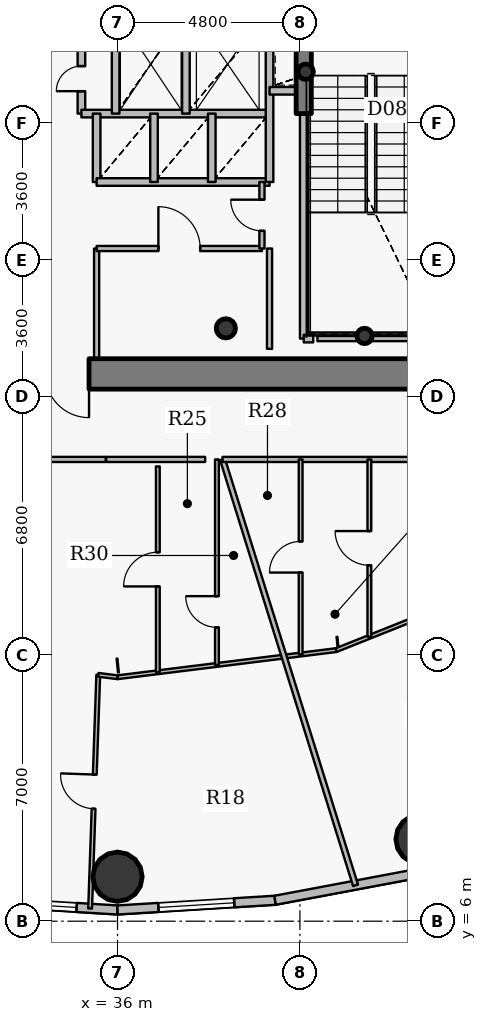
"""IFC4 building model, lengths in metres.
Left out: names, types, materials, properties, quantities, classifications, styles, units other than length and angle.
Written with IfcOpenShell. Run it as: python <this file> out.ifc"""

import sys

from ifc_helpers import new_model, si_unit, direction, frame, frame_2d, origin, origin_2d, place, context, subcontext, project, spatial, rectangle, hollow_circle, extrude, source, transform, mapped, element, fill, save


model = new_model("IFC4")
c1 = context("Model", 3, precision=1e-05, world=origin(), true_north=direction((0.0, 1.0)))
c2 = subcontext(c1, "Body", "Model", "MODEL_VIEW")
j1 = project(units=[si_unit("LENGTHUNIT", "METRE"), si_unit("PLANEANGLEUNIT", "RADIAN")], contexts=[c1])
p1 = place(None, origin())
s1 = spatial("IfcSite", under=j1, at=p1, CompositionType="ELEMENT")
p2 = place(p1, origin())
s2 = spatial("IfcBuilding", under=s1, at=p2, CompositionType="ELEMENT")
p3 = place(p2, frame((0.0, 0.0, 174.9)))
s3 = spatial("IfcBuildingStorey", under=s2, at=p3, CompositionType="ELEMENT", Elevation=174.9)
p4 = place(p3, frame((38.85, 21.6, 0.0), z_axis=(0.0, 0.0, 1.0), x_axis=(1.0, 0.0, 0.0)))
e1 = element("IfcColumn", 1, at=p4, inside=s3, PredefinedType="COLUMN", context=c2, shape_type="SweptSolid", body=[
    extrude(hollow_circle(Radius=0.254, WallThickness=0.02, at=origin_2d()), origin(), (0.0, 0.0, 1.0), 3.75),
])
for number, where, z_axis, x_axis in (
    (2, (42.5, 21.4, 0.0), (0.0, 0.0, 1.0), (1.0, 0.0, 0.0)),
    (3, (40.95, 28.35, 0.0), (0.0, 0.0, 1.0), (1.0, 0.0, 0.0)),
):
    element("IfcColumn", number, at=place(p3, frame(where, z_axis=z_axis, x_axis=x_axis)), inside=s3, PredefinedType="COLUMN", context=c2, shape_type="SweptSolid", body=[
        extrude(hollow_circle(Radius=0.203, WallThickness=0.016, at=origin_2d()), origin(), (0.0, 0.0, 1.0), 3.75),
    ])
p5 = place(p3, frame((44.8, 20.4, 0.0), z_axis=(0.0, 0.0, 1.0), x_axis=(-1.0, 0.0, 0.0)))
e4 = element("IfcWall", 4, at=p5, inside=s3, PredefinedType="SHEAR", context=c2, shape_type="SweptSolid", body=[
    extrude(rectangle(XDim=17.6, YDim=0.8, at=frame_2d((8.8, 0.0))), origin(), (0.0, 0.0, 1.0), 2.95),
])
p6 = place(p5, frame((9.55, 0.0, 0.0)))
e5 = element("IfcOpeningElement", 5, at=p6, cuts=e4, PredefinedType="OPENING", context=c2, shape_type="SweptSolid", body=[
    extrude(rectangle(XDim=1.15, YDim=2.15, at=origin_2d()), frame((0.575, 0.41, 1.075), z_axis=(0.0, -1.0, 0.0), x_axis=(1.0, 0.0, 0.0)), (0.0, 0.0, 1.0), 0.82),
])
p7 = place(p3, frame((40.9, 27.25, 0.0), z_axis=(0.0, 0.0, 1.0), x_axis=(0.0, 1.0, 0.0)))
e6 = element("IfcWall", 6, at=p7, inside=s3, PredefinedType="SHEAR", context=c2, shape_type="SweptSolid", body=[
    extrude(rectangle(XDim=2.6, YDim=0.4, at=frame_2d((1.3, 0.0))), origin(), (0.0, 0.0, 1.0), 3.1),
])
for number, where, z_axis, x_axis in (
    (7, (36.0, 7.17, 0.0), (0.0, 0.0, 1.0), (1.0, 0.0, 0.0)),
    (8, (43.973, 8.159, 0.0), (0.0, 0.0, 1.0), (1.0, 0.0, 0.0)),
):
    element("IfcColumn", number, at=place(p3, frame(where, z_axis=z_axis, x_axis=x_axis)), inside=s3, PredefinedType="COLUMN", context=c2, shape_type="SweptSolid", body=[
        extrude(hollow_circle(Radius=0.65, WallThickness=0.04, at=origin_2d()), origin(), (0.0, 0.0, 1.0), 3.75),
    ])
p8 = place(p3, frame((36.0, 6.295, 0.0), z_axis=(0.0, 0.0, 1.0), x_axis=(-0.998104600619, 0.061540281305, 0.0)))
e9 = element("IfcWall", 9, at=p8, inside=s3, PredefinedType="SOLIDWALL", context=c2, shape_type="SweptSolid", body=[
    extrude(rectangle(XDim=4.154, YDim=0.24, at=frame_2d((2.077, 0.0))), origin(), (0.0, 0.0, 1.0), 3.5),
])
p9 = place(p8, frame((1.077, 0.0, 0.9)))
e10 = element("IfcOpeningElement", 10, at=p9, cuts=e9, PredefinedType="OPENING", context=c2, shape_type="SweptSolid", body=[
    extrude(rectangle(XDim=2.0, YDim=1.75, at=origin_2d()), frame((1.0, 0.13, 0.875), z_axis=(0.0, -1.0, 0.0), x_axis=(1.0, 0.0, 0.0)), (0.0, 0.0, 1.0), 0.26),
])
p10 = place(p3, frame((40.146, 6.551, 0.0), z_axis=(0.0, 0.0, 1.0), x_axis=(-0.998104600619, -0.061540281305, 0.0)))
e11 = element("IfcWall", 11, at=p10, inside=s3, PredefinedType="SOLIDWALL", context=c2, shape_type="SweptSolid", body=[
    extrude(rectangle(XDim=4.154, YDim=0.24, at=frame_2d((2.077, 0.0))), origin(), (0.0, 0.0, 1.0), 3.5),
])
p11 = place(p10, frame((1.077, 0.0, 0.9)))
e12 = element("IfcOpeningElement", 12, at=p11, cuts=e11, PredefinedType="OPENING", context=c2, shape_type="SweptSolid", body=[
    extrude(rectangle(XDim=2.0, YDim=1.75, at=origin_2d()), frame((1.0, 0.13, 0.875), z_axis=(0.0, -1.0, 0.0), x_axis=(1.0, 0.0, 0.0)), (0.0, 0.0, 1.0), 0.26),
])
p12 = place(p3, frame((44.189, 7.311, 0.0), z_axis=(0.0, 0.0, 1.0), x_axis=(-0.982788108205, -0.184736391573, 0.0)))
e13 = element("IfcWall", 13, at=p12, inside=s3, PredefinedType="SOLIDWALL", context=c2, shape_type="SweptSolid", body=[
    extrude(rectangle(XDim=4.114, YDim=0.24, at=frame_2d((2.057, 0.0))), origin(), (0.0, 0.0, 1.0), 3.5),
])
p13 = place(p3, frame((24.35, 18.15, 0.0), z_axis=(0.0, 0.0, 1.0), x_axis=(1.0, 0.0, 0.0)))
e14 = element("IfcWall", 14, at=p13, inside=s3, PredefinedType="PARTITIONING", context=c2, shape_type="SweptSolid", body=[
    extrude(rectangle(XDim=11.341, YDim=0.135, at=frame_2d((5.67, 0.0))), origin(), (0.0, 0.0, 1.0), 2.935),
])
p14 = place(p13, frame((7.171, 0.0, 0.0)))
e15 = element("IfcOpeningElement", 15, at=p14, cuts=e14, PredefinedType="OPENING", context=c2, shape_type="SweptSolid", body=[
    extrude(rectangle(XDim=1.0, YDim=2.15, at=origin_2d()), frame((0.5, 0.078, 1.075), z_axis=(0.0, -1.0, 0.0), x_axis=(1.0, 0.0, 0.0)), (0.0, 0.0, 1.0), 0.155),
])
p15 = place(p3, frame((35.05, 27.25, 0.0), z_axis=(0.0, 0.0, 1.0), x_axis=(0.0, 1.0, 0.0)))
e16 = element("IfcWall", 16, at=p15, inside=s3, PredefinedType="PARTITIONING", context=c2, shape_type="SweptSolid", body=[
    extrude(rectangle(XDim=3.6, YDim=0.2, at=frame_2d((1.8, 0.0))), origin(), (0.0, 0.0, 1.0), 3.5),
])
p16 = place(p15, frame((0.59, 0.0, 0.0)))
e17 = element("IfcOpeningElement", 17, at=p16, cuts=e16, PredefinedType="OPENING", context=c2, shape_type="SweptSolid", body=[
    extrude(rectangle(XDim=0.66, YDim=2.05, at=origin_2d()), frame((0.33, 0.11, 1.025), z_axis=(0.0, -1.0, 0.0), x_axis=(1.0, 0.0, 0.0)), (0.0, 0.0, 1.0), 0.22),
])
p17 = place(p15, frame((2.35, 0.0, 0.0)))
e18 = element("IfcOpeningElement", 18, at=p17, cuts=e16, PredefinedType="OPENING", context=c2, shape_type="SweptSolid", body=[
    extrude(rectangle(XDim=0.66, YDim=2.05, at=origin_2d()), frame((0.33, 0.11, 1.025), z_axis=(0.0, -1.0, 0.0), x_axis=(1.0, 0.0, 0.0)), (0.0, 0.0, 1.0), 0.22),
])
p18 = place(p3, frame((35.05, 27.25, 0.0), z_axis=(0.0, 0.0, 1.0), x_axis=(1.0, 0.0, 0.0)))
e19 = element("IfcWall", 19, at=p18, inside=s3, PredefinedType="PARTITIONING", context=c2, shape_type="SweptSolid", body=[
    extrude(rectangle(XDim=4.95, YDim=0.2, at=frame_2d((2.475, 0.0))), origin(), (0.0, 0.0, 1.0), 3.085),
])
p19 = place(p3, frame((35.278, 6.334, 0.0), z_axis=(0.0, 0.0, 1.0), x_axis=(0.034887406989, 0.999391249128, 0.0)))
e20 = element("IfcWall", 20, at=p19, inside=s3, PredefinedType="PARTITIONING", context=c2, shape_type="SweptSolid", body=[
    extrude(rectangle(XDim=6.151, YDim=0.1, at=frame_2d((3.076, 0.0))), origin(), (0.0, 0.0, 1.0), 2.935),
])
p20 = place(p19, frame((2.625, 0.0, 0.0)))
e21 = element("IfcOpeningElement", 21, at=p20, cuts=e20, PredefinedType="OPENING", context=c2, shape_type="SweptSolid", body=[
    extrude(rectangle(XDim=0.9, YDim=2.1, at=origin_2d()), frame((0.45, 0.06, 1.05), z_axis=(0.0, -1.0, 0.0), x_axis=(1.0, 0.0, 0.0)), (0.0, 0.0, 1.0), 0.12),
])
p21 = place(p3, frame((35.45, 20.8, 0.0), z_axis=(0.0, 0.0, 1.0), x_axis=(0.0, 1.0, 0.0)))
e22 = element("IfcWall", 22, at=p21, inside=s3, PredefinedType="PARTITIONING", context=c2, shape_type="SweptSolid", body=[
    extrude(rectangle(XDim=2.9, YDim=0.135, at=frame_2d((1.45, 0.0))), origin(), (0.0, 0.0, 1.0), 3.085),
])
p22 = place(p3, frame((35.45, 23.7, 0.0), z_axis=(0.0, 0.0, 1.0), x_axis=(1.0, 0.0, 0.0)))
e23 = element("IfcWall", 23, at=p22, inside=s3, PredefinedType="PARTITIONING", context=c2, shape_type="SweptSolid", body=[
    extrude(rectangle(XDim=4.35, YDim=0.135, at=frame_2d((2.175, 0.0))), origin(), (0.0, 0.0, 1.0), 3.085),
])
p23 = place(p22, frame((1.625, 0.0, 0.0)))
e24 = element("IfcOpeningElement", 24, at=p23, cuts=e23, PredefinedType="OPENING", context=c2, shape_type="SweptSolid", body=[
    extrude(rectangle(XDim=1.1, YDim=2.15, at=origin_2d()), frame((0.55, 0.078, 1.075), z_axis=(0.0, -1.0, 0.0), x_axis=(1.0, 0.0, 0.0)), (0.0, 0.0, 1.0), 0.155),
])
p24 = place(p3, frame((35.45, 25.45, 0.0), z_axis=(0.0, 0.0, 1.0), x_axis=(0.0, 1.0, 0.0)))
e25 = element("IfcWall", 25, at=p24, inside=s3, PredefinedType="PARTITIONING", context=c2, shape_type="SweptSolid", body=[
    extrude(rectangle(XDim=1.8, YDim=0.2, at=frame_2d((0.9, 0.0))), origin(), (0.0, 0.0, 1.0), 3.5),
])
p25 = place(p3, frame((35.45, 25.45, 0.0), z_axis=(0.0, 0.0, 1.0), x_axis=(1.0, 0.0, 0.0)))
e26 = element("IfcWall", 26, at=p25, inside=s3, PredefinedType="PARTITIONING", context=c2, shape_type="SweptSolid", body=[
    extrude(rectangle(XDim=4.55, YDim=0.2, at=frame_2d((2.275, 0.0))), origin(), (0.0, 0.0, 1.0), 3.085),
])
p26 = place(p3, frame((35.493, 12.482, 0.0), z_axis=(0.0, 0.0, 1.0), x_axis=(0.992373140554, -0.123270231229, 0.0)))
e27 = element("IfcWall", 27, at=p26, inside=s3, PredefinedType="PARTITIONING", context=c2, shape_type="SweptSolid", body=[
    extrude(rectangle(XDim=0.511, YDim=0.1, at=frame_2d((0.255, 0.0))), origin(), (0.0, 0.0, 1.0), 2.935),
])
p27 = place(p3, frame((35.95, 27.25, 0.0), z_axis=(0.0, 0.0, 1.0), x_axis=(0.0, 1.0, 0.0)))
e28 = element("IfcWall", 28, at=p27, inside=s3, PredefinedType="PARTITIONING", context=c2, shape_type="SweptSolid", body=[
    extrude(rectangle(XDim=3.8, YDim=0.2, at=frame_2d((1.9, 0.0))), origin(), (0.0, 0.0, 1.0), 3.5),
])
p28 = place(p3, frame((36.0, 12.419, 0.0), z_axis=(0.0, 0.0, 1.0), x_axis=(0.992396615981, 0.123081097612, 0.0)))
e29 = element("IfcWall", 29, at=p28, inside=s3, PredefinedType="PARTITIONING", context=c2, shape_type="SweptSolid", body=[
    extrude(rectangle(XDim=5.798, YDim=0.1, at=frame_2d((2.899, 0.0))), origin(), (0.0, 0.0, 1.0), 2.935),
])
p29 = place(p3, frame((36.96, 25.45, 0.0), z_axis=(0.0, 0.0, 1.0), x_axis=(0.0, 1.0, 0.0)))
e30 = element("IfcWall", 30, at=p29, inside=s3, PredefinedType="PARTITIONING", context=c2, shape_type="SweptSolid", body=[
    extrude(rectangle(XDim=1.8, YDim=0.2, at=frame_2d((0.9, 0.0))), origin(), (0.0, 0.0, 1.0), 3.5),
])
p30 = place(p3, frame((37.061, 12.551, 0.0), z_axis=(0.0, 0.0, 1.0), x_axis=(0.0, 1.0, 0.0)))
e31 = element("IfcWall", 31, at=p30, inside=s3, PredefinedType="PARTITIONING", context=c2, shape_type="SweptSolid", body=[
    extrude(rectangle(XDim=5.416, YDim=0.1, at=frame_2d((2.708, 0.0))), origin(), (0.0, 0.0, 1.0), 3.185),
])
p31 = place(p30, frame((2.258, 0.0, 0.0)))
e32 = element("IfcOpeningElement", 32, at=p31, cuts=e31, PredefinedType="OPENING", context=c2, shape_type="SweptSolid", body=[
    extrude(rectangle(XDim=0.9, YDim=2.1, at=origin_2d()), frame((0.45, 0.06, 1.05), z_axis=(0.0, -1.0, 0.0), x_axis=(1.0, 0.0, 0.0)), (0.0, 0.0, 1.0), 0.12),
])
p32 = place(p3, frame((37.8, 27.25, 0.0), z_axis=(0.0, 0.0, 1.0), x_axis=(0.0, 1.0, 0.0)))
e33 = element("IfcWall", 33, at=p32, inside=s3, PredefinedType="PARTITIONING", context=c2, shape_type="SweptSolid", body=[
    extrude(rectangle(XDim=2.6, YDim=0.2, at=frame_2d((1.3, 0.0))), origin(), (0.0, 0.0, 1.0), 3.5),
])
p33 = place(p3, frame((38.48, 25.45, 0.0), z_axis=(0.0, 0.0, 1.0), x_axis=(0.0, 1.0, 0.0)))
e34 = element("IfcWall", 34, at=p33, inside=s3, PredefinedType="PARTITIONING", context=c2, shape_type="SweptSolid", body=[
    extrude(rectangle(XDim=1.8, YDim=0.2, at=frame_2d((0.9, 0.0))), origin(), (0.0, 0.0, 1.0), 3.5),
])
p34 = place(p3, frame((38.616, 12.743, 0.0), z_axis=(0.0, 0.0, 1.0), x_axis=(0.0, 1.0, 0.0)))
e35 = element("IfcWall", 35, at=p34, inside=s3, PredefinedType="PARTITIONING", context=c2, shape_type="SweptSolid", body=[
    extrude(rectangle(XDim=5.406, YDim=0.1, at=frame_2d((2.703, 0.0))), origin(), (0.0, 0.0, 1.0), 3.185),
])
p35 = place(p34, frame((0.989, 0.0, 0.0)))
e36 = element("IfcOpeningElement", 36, at=p35, cuts=e35, PredefinedType="OPENING", context=c2, shape_type="SweptSolid", body=[
    extrude(rectangle(XDim=0.82, YDim=2.1, at=origin_2d()), frame((0.41, 0.06, 1.05), z_axis=(0.0, -1.0, 0.0), x_axis=(1.0, 0.0, 0.0)), (0.0, 0.0, 1.0), 0.12),
])
p36 = place(p3, frame((38.764, 18.15, 0.0), z_axis=(0.0, 0.0, 1.0), x_axis=(0.298084348379, -0.954539533624, 0.0)))
e37 = element("IfcWall", 37, at=p36, inside=s3, PredefinedType="PARTITIONING", context=c2, shape_type="SweptSolid", body=[
    extrude(rectangle(XDim=11.74, YDim=0.135, at=frame_2d((5.87, 0.0))), origin(), (0.0, 0.0, 1.0), 2.935),
])
p37 = place(p3, frame((38.764, 18.15, 0.0), z_axis=(0.0, 0.0, 1.0), x_axis=(1.0, 0.0, 0.0)))
e38 = element("IfcWall", 38, at=p37, inside=s3, PredefinedType="PARTITIONING", context=c2, shape_type="SweptSolid", body=[
    extrude(rectangle(XDim=9.436, YDim=0.135, at=frame_2d((4.718, 0.0))), origin(), (0.0, 0.0, 1.0), 2.935),
])
p38 = place(p37, frame((6.13, 0.0, 0.0)))
e39 = element("IfcOpeningElement", 39, at=p38, cuts=e38, PredefinedType="OPENING", context=c2, shape_type="SweptSolid", body=[
    extrude(rectangle(XDim=1.0, YDim=2.15, at=origin_2d()), frame((0.5, 0.078, 1.075), z_axis=(0.0, -1.0, 0.0), x_axis=(1.0, 0.0, 0.0)), (0.0, 0.0, 1.0), 0.155),
])
p39 = place(p3, frame((39.8, 23.7, 0.0), z_axis=(0.0, 0.0, 1.0), x_axis=(0.0, 1.0, 0.0)))
e40 = element("IfcWall", 40, at=p39, inside=s3, PredefinedType="PARTITIONING", context=c2, shape_type="SweptSolid", body=[
    extrude(rectangle(XDim=1.75, YDim=0.135, at=frame_2d((0.875, 0.0))), origin(), (0.0, 0.0, 1.0), 3.5),
])
p40 = place(p39, frame((0.465, 0.0, 0.0)))
e41 = element("IfcOpeningElement", 41, at=p40, cuts=e40, PredefinedType="OPENING", context=c2, shape_type="SweptSolid", body=[
    extrude(rectangle(XDim=0.82, YDim=2.1, at=origin_2d()), frame((0.41, 0.078, 1.05), z_axis=(0.0, -1.0, 0.0), x_axis=(1.0, 0.0, 0.0)), (0.0, 0.0, 1.0), 0.155),
])
p41 = place(p3, frame((40.0, 25.45, 0.0), z_axis=(0.0, 0.0, 1.0), x_axis=(0.0, 1.0, 0.0)))
e42 = element("IfcWall", 42, at=p41, inside=s3, PredefinedType="PARTITIONING", context=c2, shape_type="SweptSolid", body=[
    extrude(rectangle(XDim=4.4, YDim=0.2, at=frame_2d((2.2, 0.0))), origin(), (0.0, 0.0, 1.0), 3.5),
])
p42 = place(p3, frame((40.0, 27.85, 0.0), z_axis=(0.0, 0.0, 1.0), x_axis=(1.0, 0.0, 0.0)))
e43 = element("IfcWall", 43, at=p42, inside=s3, PredefinedType="PARTITIONING", context=c2, shape_type="SweptSolid", body=[
    extrude(rectangle(XDim=0.9, YDim=0.2, at=frame_2d((0.45, 0.0))), origin(), (0.0, 0.0, 1.0), 3.5),
])
p43 = place(p3, frame((40.819, 13.017, 0.0), z_axis=(0.0, 0.0, 1.0), x_axis=(0.0, 1.0, 0.0)))
e44 = element("IfcWall", 44, at=p43, inside=s3, PredefinedType="PARTITIONING", context=c2, shape_type="SweptSolid", body=[
    extrude(rectangle(XDim=5.133, YDim=0.1, at=frame_2d((2.567, 0.0))), origin(), (0.0, 0.0, 1.0), 2.935),
])
p44 = place(p43, frame((2.157, 0.0, 0.0)))
e45 = element("IfcOpeningElement", 45, at=p44, cuts=e44, PredefinedType="OPENING", context=c2, shape_type="SweptSolid", body=[
    extrude(rectangle(XDim=0.82, YDim=2.1, at=origin_2d()), frame((0.41, 0.06, 1.05), z_axis=(0.0, -1.0, 0.0), x_axis=(1.0, 0.0, 0.0)), (0.0, 0.0, 1.0), 0.12),
])
p45 = place(p3, frame((40.9, 21.33, 0.0), z_axis=(0.0, 0.0, 1.0), x_axis=(0.0, 1.0, 0.0)))
e46 = element("IfcWall", 46, at=p45, inside=s3, PredefinedType="PARTITIONING", context=c2, shape_type="SweptSolid", body=[
    extrude(rectangle(XDim=5.91, YDim=0.2, at=frame_2d((2.955, 0.0))), origin(), (0.0, 0.0, 1.0), 3.035),
])
p46 = place(p3, frame((40.9, 21.33, 0.0), z_axis=(0.0, 0.0, 1.0), x_axis=(1.0, 0.0, 0.0)))
e47 = element("IfcWall", 47, at=p46, inside=s3, PredefinedType="PARTITIONING", context=c2, shape_type="SweptSolid", body=[
    extrude(rectangle(XDim=0.25, YDim=0.2, at=frame_2d((0.125, 0.0))), origin(), (0.0, 0.0, 1.0), 3.035),
])
p47 = place(p3, frame((41.754, 13.133, 0.0), z_axis=(0.0, 0.0, 1.0), x_axis=(0.928786664236, 0.370614803182, 0.0)))
e48 = element("IfcWall", 48, at=p47, inside=s3, PredefinedType="PARTITIONING", context=c2, shape_type="SweptSolid", body=[
    extrude(rectangle(XDim=3.798, YDim=0.1, at=frame_2d((1.899, 0.0))), origin(), (0.0, 0.0, 1.0), 2.935),
])
p48 = place(p3, frame((42.627, 13.481, 0.0), z_axis=(0.0, 0.0, 1.0), x_axis=(0.0, 1.0, 0.0)))
e49 = element("IfcWall", 49, at=p48, inside=s3, PredefinedType="PARTITIONING", context=c2, shape_type="SweptSolid", body=[
    extrude(rectangle(XDim=4.669, YDim=0.1, at=frame_2d((2.334, 0.0))), origin(), (0.0, 0.0, 1.0), 3.5),
])
p49 = place(p48, frame((1.885, 0.0, 0.0)))
e50 = element("IfcOpeningElement", 50, at=p49, cuts=e49, PredefinedType="OPENING", context=c2, shape_type="SweptSolid", body=[
    extrude(rectangle(XDim=0.9, YDim=2.1, at=origin_2d()), frame((0.45, 0.06, 1.05), z_axis=(0.0, -1.0, 0.0), x_axis=(1.0, 0.0, 0.0)), (0.0, 0.0, 1.0), 0.12),
])
p50 = place(p3, frame((44.08, 21.33, 0.0), z_axis=(0.0, 0.0, 1.0), x_axis=(-1.0, 0.0, 0.0)))
e51 = element("IfcWall", 51, at=p50, inside=s3, PredefinedType="PARTITIONING", context=c2, shape_type="SweptSolid", body=[
    extrude(rectangle(XDim=2.82, YDim=0.135, at=frame_2d((1.41, 0.0))), origin(), (0.0, 0.0, 1.0), 3.035),
])
p51 = place(p3, frame((40.0, 23.7, 0.0), z_axis=(0.0, 0.0, 1.0), x_axis=(0.0, -1.0, 0.0)))
e52 = element("IfcWall", 52, at=p51, inside=s3, PredefinedType="PARTITIONING", context=c2, shape_type="SweptSolid", body=[
    extrude(rectangle(XDim=2.64, YDim=0.135, at=frame_2d((1.32, 0.0))), origin(), (0.0, 0.0, 1.0), 3.035),
])
p52 = place(p3, frame((38.306, 18.15, 0.0), z_axis=(0.0, 0.0, 1.0), x_axis=(-1.0, 0.0, 0.0)))
e53 = element("IfcWall", 53, at=p52, inside=s3, PredefinedType="PARTITIONING", context=c2, shape_type="SweptSolid", body=[
    extrude(rectangle(XDim=2.605, YDim=0.135, at=frame_2d((1.302, 0.0))), origin(), (0.0, 0.0, 1.0), 2.935),
])
m1 = source(origin(), c2, "Body", "SweptSolid", [
    extrude(rectangle(XDim=2.0, YDim=1.75, at=origin_2d()), frame((1.0, 0.03, 0.875), z_axis=(0.0, -1.0, 0.0), x_axis=(1.0, 0.0, 0.0)), (0.0, 0.0, 1.0), 0.06),
])
p53 = place(p9, origin())
e54 = element("IfcWindow", 54, at=p53, inside=s3, PartitioningType="DOUBLE_PANEL_VERTICAL", PredefinedType="WINDOW", context=c2, shape_type="MappedRepresentation", body=[
    mapped(m1, transform((0.0, 0.0, 0.0), x_axis=(1.0, 0.0, 0.0), y_axis=(0.0, 1.0, 0.0), z_axis=(0.0, 0.0, 1.0), scale=1.0)),
])
fill(e10, e54)
p54 = place(p11, origin())
e55 = element("IfcWindow", 55, at=p54, inside=s3, PartitioningType="DOUBLE_PANEL_VERTICAL", PredefinedType="WINDOW", context=c2, shape_type="MappedRepresentation", body=[
    mapped(m1, transform((0.0, 0.0, 0.0), x_axis=(1.0, 0.0, 0.0), y_axis=(0.0, 1.0, 0.0), z_axis=(0.0, 0.0, 1.0), scale=1.0)),
])
fill(e12, e55)
m2 = source(origin(), c2, "Body", "SweptSolid", [
    extrude(rectangle(XDim=1.15, YDim=2.15, at=origin_2d()), frame((0.575, 0.025, 1.075), z_axis=(0.0, -1.0, 0.0), x_axis=(1.0, 0.0, 0.0)), (0.0, 0.0, 1.0), 0.05),
])
p55 = place(p6, origin())
e56 = element("IfcDoor", 56, at=p55, inside=s3, OperationType="SINGLE_SWING_LEFT", PredefinedType="DOOR", context=c2, shape_type="MappedRepresentation", body=[
    mapped(m2, transform((0.0, 0.0, 0.0), x_axis=(1.0, 0.0, 0.0), y_axis=(0.0, 1.0, 0.0), z_axis=(0.0, 0.0, 1.0), scale=1.0)),
])
fill(e5, e56)
m3 = source(origin(), c2, "Body", "SweptSolid", [
    extrude(rectangle(XDim=0.9, YDim=2.1, at=origin_2d()), frame((0.45, 0.025, 1.05), z_axis=(0.0, -1.0, 0.0), x_axis=(1.0, 0.0, 0.0)), (0.0, 0.0, 1.0), 0.05),
])
p56 = place(p20, origin())
e57 = element("IfcDoor", 57, at=p56, inside=s3, OperationType="SINGLE_SWING_RIGHT", PredefinedType="DOOR", context=c2, shape_type="MappedRepresentation", body=[
    mapped(m3, transform((0.0, 0.0, 0.0), x_axis=(1.0, 0.0, 0.0), y_axis=(0.0, 1.0, 0.0), z_axis=(0.0, 0.0, 1.0), scale=1.0)),
])
fill(e21, e57)
p57 = place(p31, origin())
e58 = element("IfcDoor", 58, at=p57, inside=s3, OperationType="SINGLE_SWING_LEFT", PredefinedType="DOOR", context=c2, shape_type="MappedRepresentation", body=[
    mapped(m3, transform((0.0, 0.0, 0.0), x_axis=(1.0, 0.0, 0.0), y_axis=(0.0, 1.0, 0.0), z_axis=(0.0, 0.0, 1.0), scale=1.0)),
])
fill(e32, e58)
m4 = source(origin(), c2, "Body", "SweptSolid", [
    extrude(rectangle(XDim=0.82, YDim=2.1, at=origin_2d()), frame((0.41, 0.025, 1.05), z_axis=(0.0, -1.0, 0.0), x_axis=(1.0, 0.0, 0.0)), (0.0, 0.0, 1.0), 0.05),
])
p58 = place(p35, origin())
e59 = element("IfcDoor", 59, at=p58, inside=s3, OperationType="SINGLE_SWING_RIGHT", PredefinedType="DOOR", context=c2, shape_type="MappedRepresentation", body=[
    mapped(m4, transform((0.0, 0.0, 0.0), x_axis=(1.0, 0.0, 0.0), y_axis=(0.0, 1.0, 0.0), z_axis=(0.0, 0.0, 1.0), scale=1.0)),
])
fill(e36, e59)
p59 = place(p49, origin())
e60 = element("IfcDoor", 60, at=p59, inside=s3, OperationType="SINGLE_SWING_RIGHT", PredefinedType="DOOR", context=c2, shape_type="MappedRepresentation", body=[
    mapped(m3, transform((0.0, 0.0, 0.0), x_axis=(1.0, 0.0, 0.0), y_axis=(0.0, 1.0, 0.0), z_axis=(0.0, 0.0, 1.0), scale=1.0)),
])
fill(e50, e60)
p60 = place(p44, origin())
e61 = element("IfcDoor", 61, at=p60, inside=s3, OperationType="SINGLE_SWING_LEFT", PredefinedType="DOOR", context=c2, shape_type="MappedRepresentation", body=[
    mapped(m4, transform((0.0, 0.0, 0.0), x_axis=(1.0, 0.0, 0.0), y_axis=(0.0, 1.0, 0.0), z_axis=(0.0, 0.0, 1.0), scale=1.0)),
])
fill(e45, e61)
m5 = source(origin(), c2, "Body", "SweptSolid", [
    extrude(rectangle(XDim=0.66, YDim=2.05, at=origin_2d()), frame((0.33, 0.025, 1.025), z_axis=(0.0, -1.0, 0.0), x_axis=(1.0, 0.0, 0.0)), (0.0, 0.0, 1.0), 0.05),
])
p61 = place(p16, origin())
e62 = element("IfcDoor", 62, at=p61, inside=s3, OperationType="SINGLE_SWING_LEFT", PredefinedType="USERDEFINED", context=c2, shape_type="MappedRepresentation", body=[
    mapped(m5, transform((0.0, 0.0, 0.0), x_axis=(1.0, 0.0, 0.0), y_axis=(0.0, 1.0, 0.0), z_axis=(0.0, 0.0, 1.0), scale=1.0)),
])
fill(e17, e62)
m6 = source(origin(), c2, "Body", "SweptSolid", [
    extrude(rectangle(XDim=1.1, YDim=2.15, at=origin_2d()), frame((0.55, 0.025, 1.075), z_axis=(0.0, -1.0, 0.0), x_axis=(1.0, 0.0, 0.0)), (0.0, 0.0, 1.0), 0.05),
])
p62 = place(p23, origin())
e63 = element("IfcDoor", 63, at=p62, inside=s3, OperationType="SINGLE_SWING_LEFT", PredefinedType="DOOR", context=c2, shape_type="MappedRepresentation", body=[
    mapped(m6, transform((0.0, 0.0, 0.0), x_axis=(1.0, 0.0, 0.0), y_axis=(0.0, 1.0, 0.0), z_axis=(0.0, 0.0, 1.0), scale=1.0)),
])
fill(e24, e63)
p63 = place(p40, origin())
e64 = element("IfcDoor", 64, at=p63, inside=s3, OperationType="SINGLE_SWING_RIGHT", PredefinedType="DOOR", context=c2, shape_type="MappedRepresentation", body=[
    mapped(m4, transform((0.0, 0.0, 0.0), x_axis=(1.0, 0.0, 0.0), y_axis=(0.0, 1.0, 0.0), z_axis=(0.0, 0.0, 1.0), scale=1.0)),
])
fill(e41, e64)
save(model, sys.argv[1])
